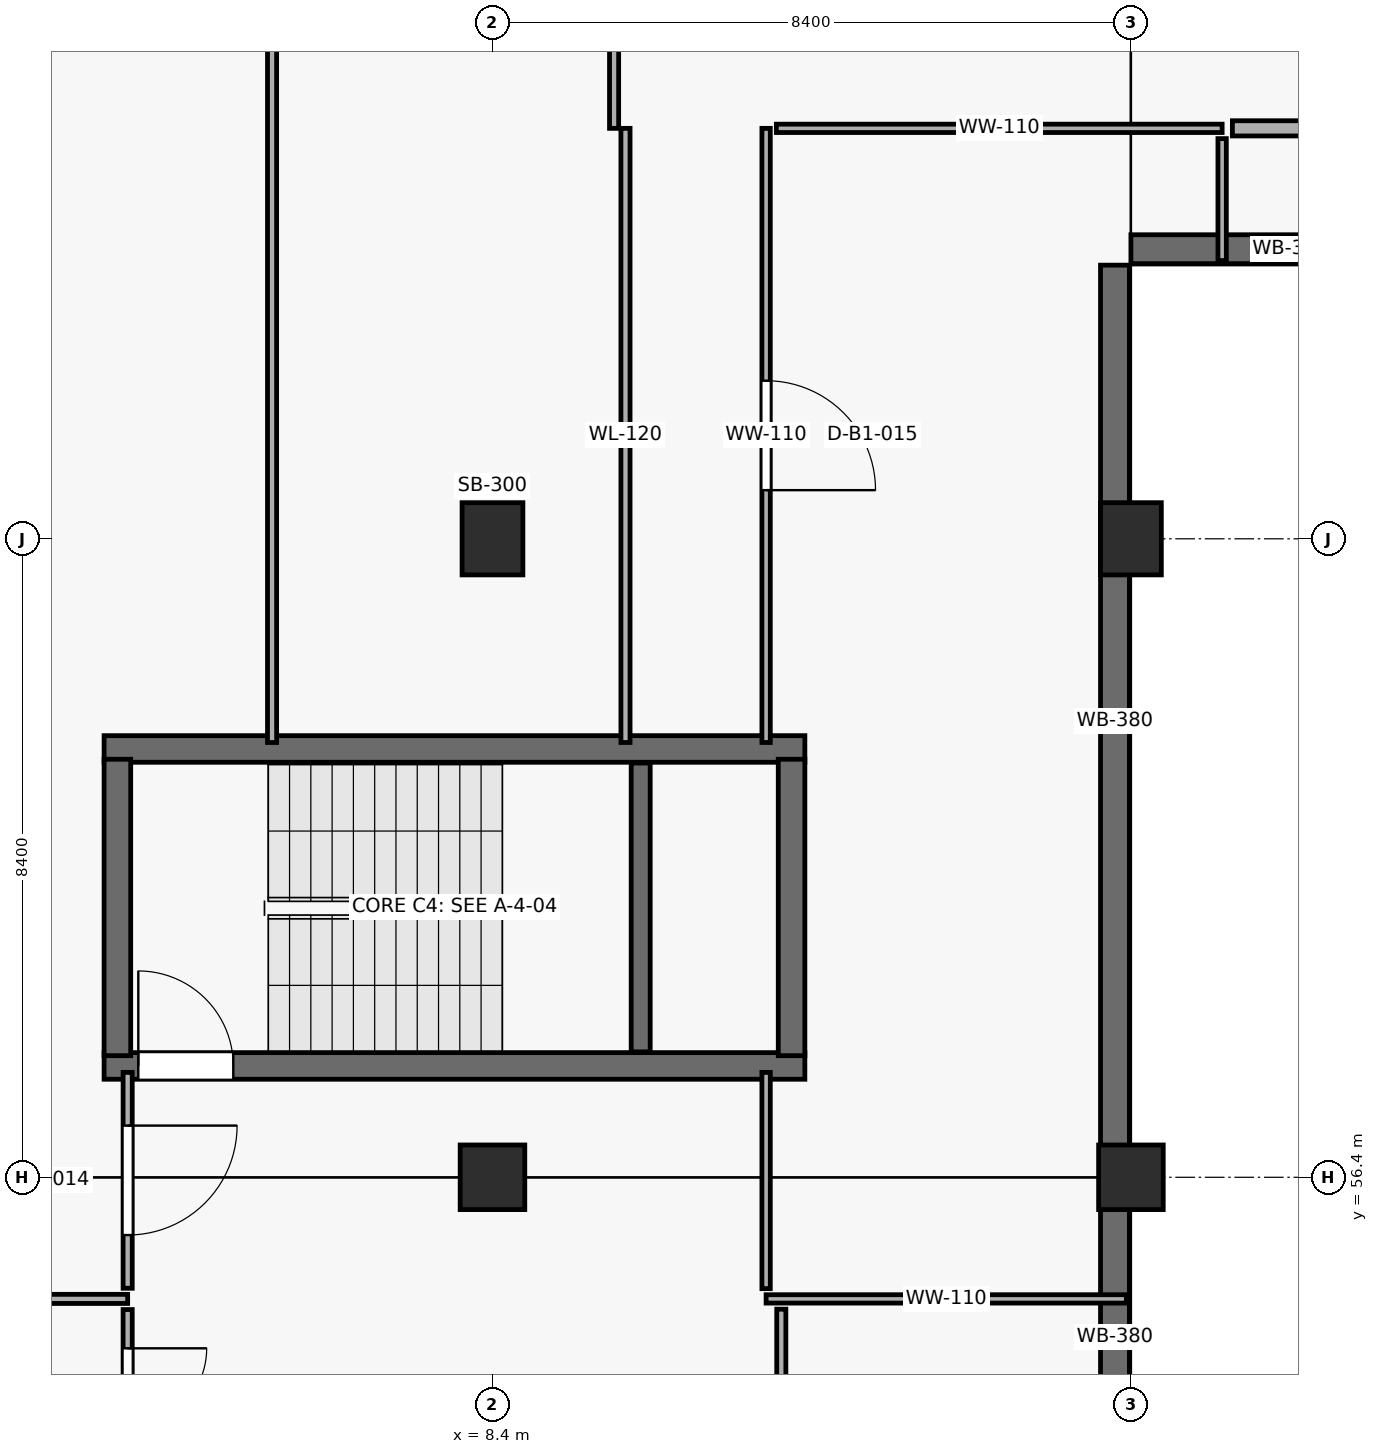
"""IFC4 building model, lengths in metres.
Left out: names, types, materials, properties, quantities, classifications, styles, units other than length and angle.
Written with IfcOpenShell. Run it as: python <this file> out.ifc"""

import sys

from ifc_helpers import new_model, si_unit, direction, frame, frame_2d, origin, origin_2d, place, context, subcontext, project, spatial, rectangle, extrude, element, fill, save


model = new_model("IFC4")
c1 = context("Model", 3, precision=1e-05, world=origin(), true_north=direction((0.0, 1.0)))
c2 = subcontext(c1, "Body", "Model", "MODEL_VIEW")
j1 = project(units=[si_unit("LENGTHUNIT", "METRE"), si_unit("PLANEANGLEUNIT", "RADIAN")], contexts=[c1])
p1 = place(None, origin())
s1 = spatial("IfcSite", under=j1, at=p1, CompositionType="ELEMENT")
p2 = place(p1, origin())
s2 = spatial("IfcBuilding", under=s1, at=p2, CompositionType="ELEMENT")
p3 = place(p2, frame((0.0, 0.0, -4.5)))
s3 = spatial("IfcBuildingStorey", under=s2, at=p3, CompositionType="ELEMENT", Elevation=-4.5)
p4 = place(p3, frame((8.4, 56.4, -0.3), z_axis=(0.0, 0.0, 1.0), x_axis=(1.0, 0.0, 0.0)))
e1 = element("IfcColumn", 1, at=p4, inside=s3, PredefinedType="COLUMN", context=c2, shape_type="SweptSolid", body=[
    extrude(rectangle(XDim=0.85, YDim=0.85, at=origin_2d()), origin(), (0.0, 0.0, 1.0), 4.8),
])
p5 = place(p3, frame((8.4, 64.8, -0.3), z_axis=(0.0, 0.0, 1.0), x_axis=(1.0, 0.0, 0.0)))
e2 = element("IfcColumn", 2, at=p5, inside=s3, PredefinedType="COLUMN", context=c2, shape_type="SweptSolid", body=[
    extrude(rectangle(XDim=0.8, YDim=0.95, at=origin_2d()), origin(), (0.0, 0.0, 1.0), 4.8),
])
p6 = place(p3, frame((16.8, 56.4, -0.3), z_axis=(0.0, 0.0, 1.0), x_axis=(1.0, 0.0, 0.0)))
e3 = element("IfcColumn", 3, at=p6, inside=s3, PredefinedType="COLUMN", context=c2, shape_type="SweptSolid", body=[
    extrude(rectangle(XDim=0.85, YDim=0.85, at=origin_2d()), origin(), (0.0, 0.0, 1.0), 4.8),
])
p7 = place(p3, frame((16.8, 64.8, -0.3), z_axis=(0.0, 0.0, 1.0), x_axis=(1.0, 0.0, 0.0)))
e4 = element("IfcColumn", 4, at=p7, inside=s3, PredefinedType="COLUMN", context=c2, shape_type="SweptSolid", body=[
    extrude(rectangle(XDim=0.8, YDim=0.95, at=origin_2d()), origin(), (0.0, 0.0, 1.0), 4.8),
])
p8 = place(p3, frame((21.0, 68.61, 0.0), z_axis=(0.0, 0.0, 1.0), x_axis=(-1.0, 0.0, 0.0)))
e5 = element("IfcWall", 5, at=p8, inside=s3, PredefinedType="SOLIDWALL", context=c2, shape_type="SweptSolid", body=[
    extrude(rectangle(XDim=4.2, YDim=0.38, at=frame_2d((2.1, 0.0))), origin(), (0.0, 0.0, 1.0), 4.22),
])
p9 = place(p3, frame((16.59, 68.4, 0.0), z_axis=(0.0, 0.0, 1.0), x_axis=(0.0, -1.0, 0.0)))
e6 = element("IfcWall", 6, at=p9, inside=s3, PredefinedType="SOLIDWALL", context=c2, shape_type="SweptSolid", body=[
    extrude(rectangle(XDim=12.0, YDim=0.38, at=frame_2d((6.0, 0.0))), origin(), (0.0, 0.0, 1.0), 4.22),
])
p10 = place(p3, frame((16.59, 56.4, 0.0), z_axis=(0.0, 0.0, 1.0), x_axis=(0.0, -1.0, 0.0)))
e7 = element("IfcWall", 7, at=p10, inside=s3, PredefinedType="SOLIDWALL", context=c2, shape_type="SweptSolid", body=[
    extrude(rectangle(XDim=4.2, YDim=0.38, at=frame_2d((2.1, 0.0))), origin(), (0.0, 0.0, 1.0), 4.22),
])
p11 = place(p3, frame((3.29, 57.865, 0.0), z_axis=(0.0, 0.0, 1.0), x_axis=(1.0, 0.0, 0.0)))
e8 = element("IfcWall", 8, at=p11, inside=s3, PredefinedType="SHEAR", context=c2, shape_type="SweptSolid", body=[
    extrude(rectangle(XDim=9.22, YDim=0.35, at=frame_2d((4.61, 0.0))), origin(), (0.0, 0.0, 1.0), 4.22),
])
p12 = place(p11, frame((0.45, 0.0, 0.0)))
e9 = element("IfcOpeningElement", 9, at=p12, cuts=e8, PredefinedType="OPENING", context=c2, shape_type="SweptSolid", body=[
    extrude(rectangle(XDim=1.25, YDim=2.2, at=frame_2d((0.625, 1.1))), frame((0.0, 0.185, 0.0), z_axis=(0.0, -1.0, 0.0), x_axis=(1.0, 0.0, 0.0)), (0.0, 0.0, 1.0), 0.37),
])
p13 = place(p3, frame((12.51, 62.035, 0.0), z_axis=(0.0, 0.0, 1.0), x_axis=(-1.0, 0.0, 0.0)))
e10 = element("IfcWall", 10, at=p13, inside=s3, PredefinedType="SHEAR", context=c2, shape_type="SweptSolid", body=[
    extrude(rectangle(XDim=9.22, YDim=0.35, at=frame_2d((4.61, 0.0))), origin(), (0.0, 0.0, 1.0), 4.22),
])
for number, where, z_axis, x_axis in (
    (11, (3.465, 58.0, 0.0), (0.0, 0.0, 1.0), (0.0, 1.0, 0.0)),
    (12, (12.335, 61.9, 0.0), (0.0, 0.0, 1.0), (0.0, -1.0, 0.0)),
):
    element("IfcWall", number, at=place(p3, frame(where, z_axis=z_axis, x_axis=x_axis)), inside=s3, PredefinedType="SHEAR", context=c2, shape_type="SweptSolid", body=[
        extrude(rectangle(XDim=3.9, YDim=0.35, at=frame_2d((1.95, 0.0))), origin(), (0.0, 0.0, 1.0), 4.22),
    ])
p14 = place(p3, frame((10.35, 58.05, 0.0), z_axis=(0.0, 0.0, 1.0), x_axis=(0.0, 1.0, 0.0)))
e13 = element("IfcWall", 13, at=p14, inside=s3, PredefinedType="SHEAR", context=c2, shape_type="SweptSolid", body=[
    extrude(rectangle(XDim=3.8, YDim=0.25, at=frame_2d((1.9, 0.0))), origin(), (0.0, 0.0, 1.0), 2.07),
])
p15 = place(p3, frame((5.5, 81.8, 0.0), z_axis=(0.0, 0.0, 1.0), x_axis=(0.0, -1.0, 0.0)))
e14 = element("IfcWall", 14, at=p15, inside=s3, PredefinedType="PARTITIONING", context=c2, shape_type="SweptSolid", body=[
    extrude(rectangle(XDim=19.68, YDim=0.12, at=frame_2d((9.84, 0.0))), origin(), (0.0, 0.0, 1.0), 4.22),
])
p16 = place(p3, frame((12.0, 62.12, 0.0), z_axis=(0.0, 0.0, 1.0), x_axis=(0.0, 1.0, 0.0)))
e15 = element("IfcWall", 15, at=p16, inside=s3, PredefinedType="PARTITIONING", context=c2, shape_type="SweptSolid", body=[
    extrude(rectangle(XDim=8.08, YDim=0.11, at=frame_2d((4.04, 0.0))), origin(), (0.0, 0.0, 1.0), 4.22),
])
p17 = place(p16, frame((3.32, 0.0, 0.0)))
e16 = element("IfcOpeningElement", 16, at=p17, cuts=e15, PredefinedType="OPENING", context=c2, shape_type="SweptSolid", body=[
    extrude(rectangle(XDim=1.44, YDim=2.34, at=frame_2d((0.72, 1.17))), frame((0.0, 0.065, 0.0), z_axis=(0.0, -1.0, 0.0), x_axis=(1.0, 0.0, 0.0)), (0.0, 0.0, 1.0), 0.13),
])
p18 = place(p3, frame((10.15, 70.2, 0.0), z_axis=(0.0, 0.0, 1.0), x_axis=(0.0, -1.0, 0.0)))
e17 = element("IfcWall", 17, at=p18, inside=s3, PredefinedType="PARTITIONING", context=c2, shape_type="SweptSolid", body=[
    extrude(rectangle(XDim=8.08, YDim=0.12, at=frame_2d((4.04, 0.0))), origin(), (0.0, 0.0, 1.0), 4.22),
])
p19 = place(p3, frame((12.135, 70.2, 0.0), z_axis=(0.0, 0.0, 1.0), x_axis=(1.0, 0.0, 0.0)))
e18 = element("IfcWall", 18, at=p19, inside=s3, PredefinedType="PARTITIONING", context=c2, shape_type="SweptSolid", body=[
    extrude(rectangle(XDim=5.865, YDim=0.11, at=frame_2d((2.933, 0.0))), origin(), (0.0, 0.0, 1.0), 4.22),
])
p20 = place(p3, frame((16.74, 54.8, 0.0), z_axis=(0.0, 0.0, 1.0), x_axis=(-1.0, 0.0, 0.0)))
e19 = element("IfcWall", 19, at=p20, inside=s3, PredefinedType="PARTITIONING", context=c2, shape_type="SweptSolid", body=[
    extrude(rectangle(XDim=4.74, YDim=0.11, at=frame_2d((2.37, 0.0))), origin(), (0.0, 0.0, 1.0), 4.22),
])
p21 = place(p3, frame((0.06, 54.8, 0.0), z_axis=(0.0, 0.0, 1.0), x_axis=(1.0, 0.0, 0.0)))
e20 = element("IfcWall", 20, at=p21, inside=s3, PredefinedType="PARTITIONING", context=c2, shape_type="SweptSolid", body=[
    extrude(rectangle(XDim=3.54, YDim=0.12, at=frame_2d((1.77, 0.0))), origin(), (0.0, 0.0, 1.0), 4.22),
])
p22 = place(p3, frame((3.6, 57.78, 0.0), z_axis=(0.0, 0.0, 1.0), x_axis=(0.0, -1.0, 0.0)))
e21 = element("IfcWall", 21, at=p22, inside=s3, PredefinedType="PARTITIONING", context=c2, shape_type="SweptSolid", body=[
    extrude(rectangle(XDim=2.84, YDim=0.12, at=frame_2d((1.42, 0.0))), origin(), (0.0, 0.0, 1.0), 4.22),
])
p23 = place(p22, frame((0.7, 0.0, 0.0)))
e22 = element("IfcOpeningElement", 22, at=p23, cuts=e21, PredefinedType="OPENING", context=c2, shape_type="SweptSolid", body=[
    extrude(rectangle(XDim=1.44, YDim=2.34, at=frame_2d((0.72, 1.17))), frame((0.0, 0.07, 0.0), z_axis=(0.0, -1.0, 0.0), x_axis=(1.0, 0.0, 0.0)), (0.0, 0.0, 1.0), 0.14),
])
p24 = place(p3, frame((12.0, 54.935, 0.0), z_axis=(0.0, 0.0, 1.0), x_axis=(0.0, 1.0, 0.0)))
e23 = element("IfcWall", 23, at=p24, inside=s3, PredefinedType="PARTITIONING", context=c2, shape_type="SweptSolid", body=[
    extrude(rectangle(XDim=2.845, YDim=0.11, at=frame_2d((1.422, 0.0))), origin(), (0.0, 0.0, 1.0), 4.22),
])
p25 = place(p3, frame((3.6, 54.66, 0.0), z_axis=(0.0, 0.0, 1.0), x_axis=(0.0, -1.0, 0.0)))
e24 = element("IfcWall", 24, at=p25, inside=s3, PredefinedType="PARTITIONING", context=c2, shape_type="SweptSolid", body=[
    extrude(rectangle(XDim=2.06, YDim=0.12, at=frame_2d((1.03, 0.0))), origin(), (0.0, 0.0, 1.0), 4.22),
])
p26 = place(p25, frame((0.51, 0.0, 0.0)))
e25 = element("IfcOpeningElement", 25, at=p26, cuts=e24, PredefinedType="OPENING", context=c2, shape_type="SweptSolid", body=[
    extrude(rectangle(XDim=1.04, YDim=2.26, at=frame_2d((0.52, 1.13))), frame((0.0, 0.07, 0.0), z_axis=(0.0, -1.0, 0.0), x_axis=(1.0, 0.0, 0.0)), (0.0, 0.0, 1.0), 0.14),
])
p27 = place(p3, frame((12.2, 52.6, 0.0), z_axis=(0.0, 0.0, 1.0), x_axis=(0.0, 1.0, 0.0)))
e26 = element("IfcWall", 26, at=p27, inside=s3, PredefinedType="PARTITIONING", context=c2, shape_type="SweptSolid", body=[
    extrude(rectangle(XDim=2.065, YDim=0.12, at=frame_2d((1.032, 0.0))), origin(), (0.0, 0.0, 1.0), 4.22),
])
p28 = place(p3, frame((10.0, 72.3, 0.0), z_axis=(0.0, 0.0, 1.0), x_axis=(0.0, -1.0, 0.0)))
e27 = element("IfcWall", 27, at=p28, inside=s3, PredefinedType="PARTITIONING", context=c2, shape_type="SweptSolid", body=[
    extrude(rectangle(XDim=2.1, YDim=0.12, at=frame_2d((1.05, 0.0))), origin(), (0.0, 0.0, 1.0), 4.22),
])
p29 = place(p3, frame((18.135, 70.2, 0.0), z_axis=(0.0, 0.0, 1.0), x_axis=(1.0, 0.0, 0.0)))
e28 = element("IfcWall", 28, at=p29, inside=s3, PredefinedType="PARTITIONING", context=c2, shape_type="SweptSolid", body=[
    extrude(rectangle(XDim=1.766, YDim=0.2, at=frame_2d((0.883, 0.0))), origin(), (0.0, 0.0, 1.0), 4.22),
])
p30 = place(p3, frame((18.0, 70.065, 0.0), z_axis=(0.0, 0.0, 1.0), x_axis=(0.0, -1.0, 0.0)))
e29 = element("IfcWall", 29, at=p30, inside=s3, PredefinedType="PARTITIONING", context=c2, shape_type="SweptSolid", body=[
    extrude(rectangle(XDim=1.605, YDim=0.11, at=frame_2d((0.802, 0.0))), origin(), (0.0, 0.0, 1.0), 4.22),
])
p31 = place(p12, origin())
e30 = element("IfcDoor", 30, at=p31, inside=s3, OperationType="SINGLE_SWING_LEFT", PredefinedType="DOOR", context=c2, shape_type="SweptSolid", body=[
    extrude(rectangle(XDim=1.25, YDim=2.2, at=frame_2d((0.625, 1.1))), frame((0.0, 0.025, 0.0), z_axis=(0.0, -1.0, 0.0), x_axis=(1.0, 0.0, 0.0)), (0.0, 0.0, 1.0), 0.05),
])
fill(e9, e30)
p32 = place(p26, origin())
e31 = element("IfcDoor", 31, at=p32, inside=s3, OperationType="SINGLE_SWING_LEFT", PredefinedType="DOOR", context=c2, shape_type="SweptSolid", body=[
    extrude(rectangle(XDim=1.04, YDim=2.26, at=frame_2d((0.52, 1.13))), frame((0.0, 0.025, 0.0), z_axis=(0.0, -1.0, 0.0), x_axis=(1.0, 0.0, 0.0)), (0.0, 0.0, 1.0), 0.05),
])
fill(e25, e31)
p33 = place(p23, origin())
e32 = element("IfcDoor", 32, at=p33, inside=s3, OperationType="SINGLE_SWING_LEFT", PredefinedType="DOOR", context=c2, shape_type="SweptSolid", body=[
    extrude(rectangle(XDim=1.44, YDim=2.34, at=frame_2d((0.72, 1.17))), frame((0.0, 0.025, 0.0), z_axis=(0.0, -1.0, 0.0), x_axis=(1.0, 0.0, 0.0)), (0.0, 0.0, 1.0), 0.05),
])
fill(e22, e32)
p34 = place(p17, origin())
e33 = element("IfcDoor", 33, at=p34, inside=s3, OperationType="SINGLE_SWING_RIGHT", PredefinedType="DOOR", context=c2, shape_type="SweptSolid", body=[
    extrude(rectangle(XDim=1.44, YDim=2.34, at=frame_2d((0.72, 1.17))), frame((0.0, 0.025, 0.0), z_axis=(0.0, -1.0, 0.0), x_axis=(1.0, 0.0, 0.0)), (0.0, 0.0, 1.0), 0.05),
])
fill(e16, e33)
save(model, sys.argv[1])
